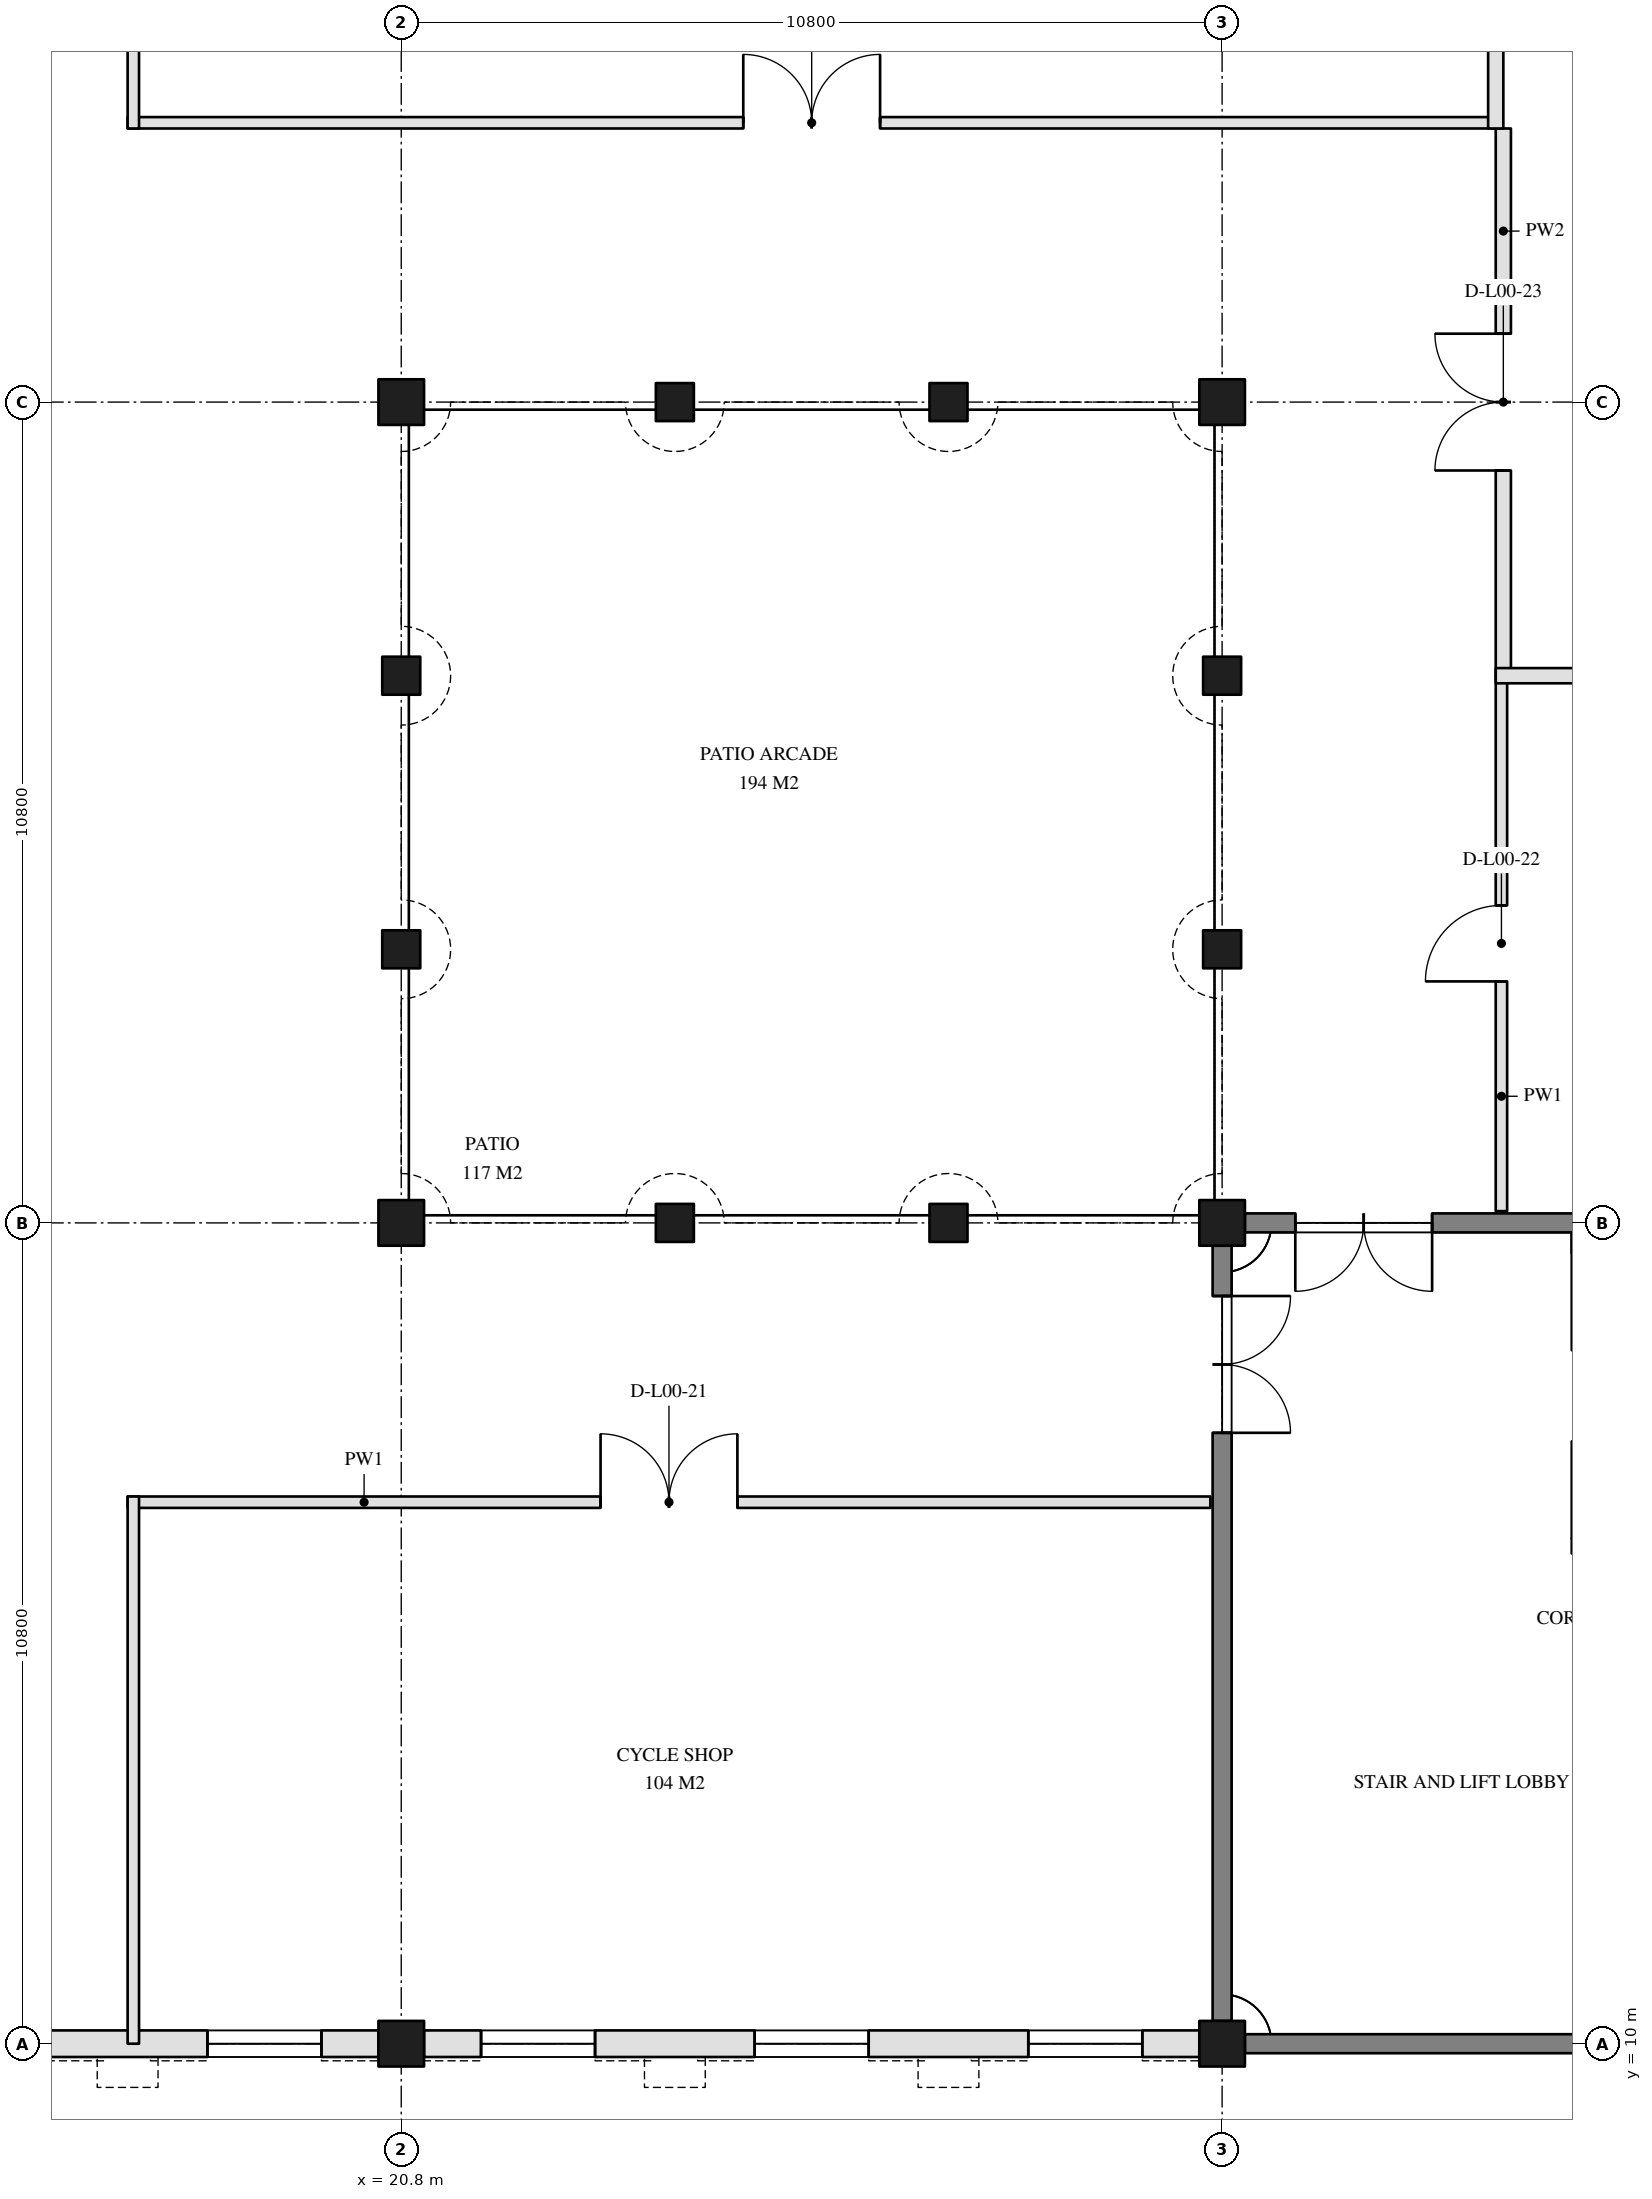
"""IFC4 building model, lengths in metres.
Left out: names, types, materials, properties, quantities, classifications, styles, units other than length and angle.
Written with IfcOpenShell. Run it as: python <this file> out.ifc"""

import sys

from ifc_helpers import new_model, si_unit, direction, frame, frame_2d, origin, origin_2d, place, context, subcontext, project, spatial, rectangle, extrude, element, fill, save


model = new_model("IFC4")
c1 = context("Model", 3, precision=1e-05, world=origin(), true_north=direction((0.0, 1.0)))
c2 = subcontext(c1, "Body", "Model", "MODEL_VIEW")
j1 = project(units=[si_unit("LENGTHUNIT", "METRE"), si_unit("PLANEANGLEUNIT", "RADIAN")], contexts=[c1])
p1 = place(None, origin())
s1 = spatial("IfcSite", under=j1, at=p1, CompositionType="ELEMENT")
p2 = place(p1, origin())
s2 = spatial("IfcBuilding", under=s1, at=p2, CompositionType="ELEMENT")
p3 = place(p2, origin())
s3 = spatial("IfcBuildingStorey", under=s2, at=p3, CompositionType="ELEMENT", Elevation=0.0)
p4 = place(p3, frame((20.8, 10.0, 0.0), z_axis=(0.0, 0.0, 1.0), x_axis=(1.0, 0.0, 0.0)))
e1 = element("IfcColumn", 1, at=p4, inside=s3, PredefinedType="COLUMN", context=c2, shape_type="SweptSolid", body=[
    extrude(rectangle(XDim=0.6, YDim=0.6, at=origin_2d()), origin(), (0.0, 0.0, 1.0), 3.85),
])
for number, where, z_axis, x_axis in (
    (2, (20.8, 20.8, 0.0), (0.0, 0.0, 1.0), (1.0, 0.0, 0.0)),
    (3, (20.8, 31.6, 0.0), (0.0, 0.0, 1.0), (1.0, 0.0, 0.0)),
):
    element("IfcColumn", number, at=place(p3, frame(where, z_axis=z_axis, x_axis=x_axis)), inside=s3, PredefinedType="COLUMN", context=c2, shape_type="SweptSolid", body=[
        extrude(rectangle(XDim=0.6, YDim=0.6, at=origin_2d()), origin(), (0.0, 0.0, 1.0), 4.8),
    ])
p5 = place(p3, frame((31.6, 10.0, 0.0), z_axis=(0.0, 0.0, 1.0), x_axis=(1.0, 0.0, 0.0)))
e4 = element("IfcColumn", 4, at=p5, inside=s3, PredefinedType="COLUMN", context=c2, shape_type="SweptSolid", body=[
    extrude(rectangle(XDim=0.6, YDim=0.6, at=origin_2d()), origin(), (0.0, 0.0, 1.0), 3.85),
])
for number, where, z_axis, x_axis in (
    (5, (31.6, 20.8, 0.0), (0.0, 0.0, 1.0), (1.0, 0.0, 0.0)),
    (6, (31.6, 31.6, 0.0), (0.0, 0.0, 1.0), (1.0, 0.0, 0.0)),
):
    element("IfcColumn", number, at=place(p3, frame(where, z_axis=z_axis, x_axis=x_axis)), inside=s3, PredefinedType="COLUMN", context=c2, shape_type="SweptSolid", body=[
        extrude(rectangle(XDim=0.6, YDim=0.6, at=origin_2d()), origin(), (0.0, 0.0, 1.0), 4.8),
    ])
for number, where, z_axis, x_axis in (
    (7, (24.4, 20.8, 0.0), (0.0, 0.0, 1.0), (1.0, 0.0, 0.0)),
    (8, (24.4, 31.6, 0.0), (0.0, 0.0, 1.0), (1.0, 0.0, 0.0)),
    (9, (20.8, 24.4, 0.0), (0.0, 0.0, 1.0), (1.0, 0.0, 0.0)),
    (10, (31.6, 24.4, 0.0), (0.0, 0.0, 1.0), (1.0, 0.0, 0.0)),
    (11, (28.0, 20.8, 0.0), (0.0, 0.0, 1.0), (1.0, 0.0, 0.0)),
    (12, (28.0, 31.6, 0.0), (0.0, 0.0, 1.0), (1.0, 0.0, 0.0)),
    (13, (20.8, 28.0, 0.0), (0.0, 0.0, 1.0), (1.0, 0.0, 0.0)),
    (14, (31.6, 28.0, 0.0), (0.0, 0.0, 1.0), (1.0, 0.0, 0.0)),
):
    element("IfcColumn", number, at=place(p3, frame(where, z_axis=z_axis, x_axis=x_axis)), inside=s3, PredefinedType="COLUMN", context=c2, shape_type="SweptSolid", body=[
        extrude(rectangle(XDim=0.5, YDim=0.5, at=origin_2d()), origin(), (0.0, 0.0, 1.0), 4.8),
    ])
p6 = place(p3, frame((31.9, 10.0, 0.0), z_axis=(0.0, 0.0, 1.0), x_axis=(1.0, 0.0, 0.0)))
e15 = element("IfcWall", 15, at=p6, inside=s3, PredefinedType="SOLIDWALL", context=c2, shape_type="SweptSolid", body=[
    extrude(rectangle(XDim=10.2, YDim=0.25, at=frame_2d((5.1, 0.0))), origin(), (0.0, 0.0, 1.0), 4.8),
])
p7 = place(p3, frame((42.1, 20.8, 0.0), z_axis=(0.0, 0.0, 1.0), x_axis=(-1.0, 0.0, 0.0)))
e16 = element("IfcWall", 16, at=p7, inside=s3, PredefinedType="SOLIDWALL", context=c2, shape_type="SweptSolid", body=[
    extrude(rectangle(XDim=10.2, YDim=0.25, at=frame_2d((5.1, 0.0))), origin(), (0.0, 0.0, 1.0), 4.8),
])
p8 = place(p7, frame((7.737, 0.0, 0.0)))
e17 = element("IfcOpeningElement", 17, at=p8, cuts=e16, PredefinedType="OPENING", context=c2, shape_type="SweptSolid", body=[
    extrude(rectangle(XDim=1.8, YDim=2.1, at=frame_2d((0.9, 1.05))), frame((0.0, 0.135, 0.0), z_axis=(0.0, -1.0, 0.0), x_axis=(1.0, 0.0, 0.0)), (0.0, 0.0, 1.0), 0.27),
])
p9 = place(p3, frame((31.6, 20.5, 0.0), z_axis=(0.0, 0.0, 1.0), x_axis=(0.0, -1.0, 0.0)))
e18 = element("IfcWall", 18, at=p9, inside=s3, PredefinedType="SOLIDWALL", context=c2, shape_type="SweptSolid", body=[
    extrude(rectangle(XDim=10.2, YDim=0.25, at=frame_2d((5.1, 0.0))), origin(), (0.0, 0.0, 1.0), 4.8),
])
p10 = place(p9, frame((0.662, 0.0, 0.0)))
e19 = element("IfcOpeningElement", 19, at=p10, cuts=e18, PredefinedType="OPENING", context=c2, shape_type="SweptSolid", body=[
    extrude(rectangle(XDim=1.8, YDim=2.1, at=frame_2d((0.9, 1.05))), frame((0.0, 0.135, 0.0), z_axis=(0.0, -1.0, 0.0), x_axis=(1.0, 0.0, 0.0)), (0.0, 0.0, 1.0), 0.27),
])
p11 = place(p3, frame((10.3, 10.0, 0.0), z_axis=(0.0, 0.0, 1.0), x_axis=(1.0, 0.0, 0.0)))
e20 = element("IfcWall", 20, at=p11, inside=s3, PredefinedType="SOLIDWALL", context=c2, shape_type="SweptSolid", body=[
    extrude(rectangle(XDim=10.2, YDim=0.35, at=frame_2d((5.1, 0.0))), origin(), (0.0, 0.0, 1.0), 3.85),
])
p12 = place(p11, frame((0.75, 0.0, 0.9)))
e21 = element("IfcOpeningElement", 21, at=p12, cuts=e20, PredefinedType="OPENING", context=c2, shape_type="SweptSolid", body=[
    extrude(rectangle(XDim=1.5, YDim=2.4, at=frame_2d((0.75, 1.2))), frame((0.0, 0.185, 0.0), z_axis=(0.0, -1.0, 0.0), x_axis=(1.0, 0.0, 0.0)), (0.0, 0.0, 1.0), 0.37),
])
p13 = place(p11, frame((4.35, 0.0, 0.9)))
e22 = element("IfcOpeningElement", 22, at=p13, cuts=e20, PredefinedType="OPENING", context=c2, shape_type="SweptSolid", body=[
    extrude(rectangle(XDim=1.5, YDim=2.4, at=frame_2d((0.75, 1.2))), frame((0.0, 0.185, 0.0), z_axis=(0.0, -1.0, 0.0), x_axis=(1.0, 0.0, 0.0)), (0.0, 0.0, 1.0), 0.37),
])
p14 = place(p11, frame((7.95, 0.0, 0.9)))
e23 = element("IfcOpeningElement", 23, at=p14, cuts=e20, PredefinedType="OPENING", context=c2, shape_type="SweptSolid", body=[
    extrude(rectangle(XDim=1.5, YDim=2.4, at=frame_2d((0.75, 1.2))), frame((0.0, 0.185, 0.0), z_axis=(0.0, -1.0, 0.0), x_axis=(1.0, 0.0, 0.0)), (0.0, 0.0, 1.0), 0.37),
])
p15 = place(p3, frame((21.1, 10.0, 0.0), z_axis=(0.0, 0.0, 1.0), x_axis=(1.0, 0.0, 0.0)))
e24 = element("IfcWall", 24, at=p15, inside=s3, PredefinedType="SOLIDWALL", context=c2, shape_type="SweptSolid", body=[
    extrude(rectangle(XDim=10.2, YDim=0.35, at=frame_2d((5.1, 0.0))), origin(), (0.0, 0.0, 1.0), 3.85),
])
p16 = place(p15, frame((0.75, 0.0, 0.9)))
e25 = element("IfcOpeningElement", 25, at=p16, cuts=e24, PredefinedType="OPENING", context=c2, shape_type="SweptSolid", body=[
    extrude(rectangle(XDim=1.5, YDim=2.4, at=frame_2d((0.75, 1.2))), frame((0.0, 0.185, 0.0), z_axis=(0.0, -1.0, 0.0), x_axis=(1.0, 0.0, 0.0)), (0.0, 0.0, 1.0), 0.37),
])
p17 = place(p15, frame((4.35, 0.0, 0.9)))
e26 = element("IfcOpeningElement", 26, at=p17, cuts=e24, PredefinedType="OPENING", context=c2, shape_type="SweptSolid", body=[
    extrude(rectangle(XDim=1.5, YDim=2.4, at=frame_2d((0.75, 1.2))), frame((0.0, 0.185, 0.0), z_axis=(0.0, -1.0, 0.0), x_axis=(1.0, 0.0, 0.0)), (0.0, 0.0, 1.0), 0.37),
])
p18 = place(p15, frame((7.95, 0.0, 0.9)))
e27 = element("IfcOpeningElement", 27, at=p18, cuts=e24, PredefinedType="OPENING", context=c2, shape_type="SweptSolid", body=[
    extrude(rectangle(XDim=1.5, YDim=2.4, at=frame_2d((0.75, 1.2))), frame((0.0, 0.185, 0.0), z_axis=(0.0, -1.0, 0.0), x_axis=(1.0, 0.0, 0.0)), (0.0, 0.0, 1.0), 0.37),
])
p19 = place(p3, frame((17.2, 17.125, 0.0), z_axis=(0.0, 0.0, 1.0), x_axis=(1.0, 0.0, 0.0)))
e28 = element("IfcWall", 28, at=p19, inside=s3, PredefinedType="PARTITIONING", context=c2, shape_type="SweptSolid", body=[
    extrude(rectangle(XDim=14.245, YDim=0.15, at=frame_2d((7.123, 0.0))), origin(), (0.0, 0.0, 1.0), 3.94),
])
p20 = place(p19, frame((6.222, 0.0, 0.0)))
e29 = element("IfcOpeningElement", 29, at=p20, cuts=e28, PredefinedType="OPENING", context=c2, shape_type="SweptSolid", body=[
    extrude(rectangle(XDim=1.8, YDim=2.1, at=frame_2d((0.9, 1.05))), frame((0.0, 0.085, 0.0), z_axis=(0.0, -1.0, 0.0), x_axis=(1.0, 0.0, 0.0)), (0.0, 0.0, 1.0), 0.17),
])
p21 = place(p3, frame((35.275, 20.955, 0.0), z_axis=(0.0, 0.0, 1.0), x_axis=(0.0, 1.0, 0.0)))
e30 = element("IfcWall", 30, at=p21, inside=s3, PredefinedType="PARTITIONING", context=c2, shape_type="SweptSolid", body=[
    extrude(rectangle(XDim=7.045, YDim=0.15, at=frame_2d((3.522, 0.0))), origin(), (0.0, 0.0, 1.0), 4.19),
])
p22 = place(p21, frame((3.022, 0.0, 0.0)))
e31 = element("IfcOpeningElement", 31, at=p22, cuts=e30, PredefinedType="OPENING", context=c2, shape_type="SweptSolid", body=[
    extrude(rectangle(XDim=1.0, YDim=2.1, at=frame_2d((0.5, 1.05))), frame((0.0, 0.085, 0.0), z_axis=(0.0, -1.0, 0.0), x_axis=(1.0, 0.0, 0.0)), (0.0, 0.0, 1.0), 0.17),
])
p23 = place(p3, frame((35.3, 28.0, 0.0), z_axis=(0.0, 0.0, 1.0), x_axis=(0.0, 1.0, 0.0)))
e32 = element("IfcWall", 32, at=p23, inside=s3, PredefinedType="PARTITIONING", context=c2, shape_type="SweptSolid", body=[
    extrude(rectangle(XDim=7.2, YDim=0.2, at=frame_2d((3.6, 0.0))), origin(), (0.0, 0.0, 1.0), 3.94),
])
p24 = place(p23, frame((2.7, 0.0, 0.0)))
e33 = element("IfcOpeningElement", 33, at=p24, cuts=e32, PredefinedType="OPENING", context=c2, shape_type="SweptSolid", body=[
    extrude(rectangle(XDim=1.8, YDim=2.1, at=frame_2d((0.9, 1.05))), frame((0.0, 0.11, 0.0), z_axis=(0.0, -1.0, 0.0), x_axis=(1.0, 0.0, 0.0)), (0.0, 0.0, 1.0), 0.22),
])
p25 = place(p3, frame((17.2, 35.275, 0.0), z_axis=(0.0, 0.0, 1.0), x_axis=(1.0, 0.0, 0.0)))
e34 = element("IfcWall", 34, at=p25, inside=s3, PredefinedType="PARTITIONING", context=c2, shape_type="SweptSolid", body=[
    extrude(rectangle(XDim=18.0, YDim=0.15, at=frame_2d((9.0, 0.0))), origin(), (0.0, 0.0, 1.0), 3.94),
])
p26 = place(p25, frame((8.1, 0.0, 0.0)))
e35 = element("IfcOpeningElement", 35, at=p26, cuts=e34, PredefinedType="OPENING", context=c2, shape_type="SweptSolid", body=[
    extrude(rectangle(XDim=1.8, YDim=2.1, at=frame_2d((0.9, 1.05))), frame((0.0, 0.085, 0.0), z_axis=(0.0, -1.0, 0.0), x_axis=(1.0, 0.0, 0.0)), (0.0, 0.0, 1.0), 0.17),
])
for number, where, z_axis, x_axis in (
    (36, (17.275, 10.0, 0.0), (0.0, 0.0, 1.0), (0.0, 1.0, 0.0)),
    (37, (17.275, 35.2, 0.0), (0.0, 0.0, 1.0), (0.0, 1.0, 0.0)),
):
    element("IfcWall", number, at=place(p3, frame(where, z_axis=z_axis, x_axis=x_axis)), inside=s3, PredefinedType="PARTITIONING", context=c2, shape_type="SweptSolid", body=[
        extrude(rectangle(XDim=7.2, YDim=0.15, at=frame_2d((3.6, 0.0))), origin(), (0.0, 0.0, 1.0), 3.85),
    ])
for number, where, z_axis, x_axis in (
    (38, (35.2, 28.0, 0.0), (0.0, 0.0, 1.0), (1.0, 0.0, 0.0)),
    (39, (35.2, 35.2, 0.0), (0.0, 0.0, 1.0), (0.0, 1.0, 0.0)),
):
    element("IfcWall", number, at=place(p3, frame(where, z_axis=z_axis, x_axis=x_axis)), inside=s3, PredefinedType="PARTITIONING", context=c2, shape_type="SweptSolid", body=[
        extrude(rectangle(XDim=7.2, YDim=0.2, at=frame_2d((3.6, 0.0))), origin(), (0.0, 0.0, 1.0), 3.85),
    ])
p27 = place(p14, origin())
e40 = element("IfcWindow", 40, at=p27, inside=s3, PartitioningType="SINGLE_PANEL", PredefinedType="WINDOW", context=c2, shape_type="SweptSolid", body=[
    extrude(rectangle(XDim=1.5, YDim=2.4, at=frame_2d((0.75, 1.2))), frame((0.0, 0.03, 0.0), z_axis=(0.0, -1.0, 0.0), x_axis=(1.0, 0.0, 0.0)), (0.0, 0.0, 1.0), 0.06),
])
fill(e23, e40)
p28 = place(p16, origin())
e41 = element("IfcWindow", 41, at=p28, inside=s3, PartitioningType="SINGLE_PANEL", PredefinedType="WINDOW", context=c2, shape_type="SweptSolid", body=[
    extrude(rectangle(XDim=1.5, YDim=2.4, at=frame_2d((0.75, 1.2))), frame((0.0, 0.03, 0.0), z_axis=(0.0, -1.0, 0.0), x_axis=(1.0, 0.0, 0.0)), (0.0, 0.0, 1.0), 0.06),
])
fill(e25, e41)
p29 = place(p17, origin())
e42 = element("IfcWindow", 42, at=p29, inside=s3, PartitioningType="SINGLE_PANEL", PredefinedType="WINDOW", context=c2, shape_type="SweptSolid", body=[
    extrude(rectangle(XDim=1.5, YDim=2.4, at=frame_2d((0.75, 1.2))), frame((0.0, 0.03, 0.0), z_axis=(0.0, -1.0, 0.0), x_axis=(1.0, 0.0, 0.0)), (0.0, 0.0, 1.0), 0.06),
])
fill(e26, e42)
p30 = place(p18, origin())
e43 = element("IfcWindow", 43, at=p30, inside=s3, PartitioningType="SINGLE_PANEL", PredefinedType="WINDOW", context=c2, shape_type="SweptSolid", body=[
    extrude(rectangle(XDim=1.5, YDim=2.4, at=frame_2d((0.75, 1.2))), frame((0.0, 0.03, 0.0), z_axis=(0.0, -1.0, 0.0), x_axis=(1.0, 0.0, 0.0)), (0.0, 0.0, 1.0), 0.06),
])
fill(e27, e43)
p31 = place(p10, frame((1.8, 0.0, 0.0), z_axis=(0.0, 0.0, 1.0), x_axis=(-1.0, 0.0, 0.0)))
e44 = element("IfcDoor", 44, at=p31, inside=s3, OperationType="DOUBLE_DOOR_DOUBLE_SWING", PredefinedType="DOOR", context=c2, shape_type="SweptSolid", body=[
    extrude(rectangle(XDim=1.8, YDim=2.1, at=frame_2d((0.9, 1.05))), frame((0.0, 0.025, 0.0), z_axis=(0.0, -1.0, 0.0), x_axis=(1.0, 0.0, 0.0)), (0.0, 0.0, 1.0), 0.05),
])
fill(e19, e44)
p32 = place(p8, frame((1.8, 0.0, 0.0), z_axis=(0.0, 0.0, 1.0), x_axis=(-1.0, 0.0, 0.0)))
e45 = element("IfcDoor", 45, at=p32, inside=s3, OperationType="DOUBLE_DOOR_DOUBLE_SWING", PredefinedType="DOOR", context=c2, shape_type="SweptSolid", body=[
    extrude(rectangle(XDim=1.8, YDim=2.1, at=frame_2d((0.9, 1.05))), frame((0.0, 0.025, 0.0), z_axis=(0.0, -1.0, 0.0), x_axis=(1.0, 0.0, 0.0)), (0.0, 0.0, 1.0), 0.05),
])
fill(e17, e45)
p33 = place(p20, frame((1.8, 0.0, 0.0), z_axis=(0.0, 0.0, 1.0), x_axis=(-1.0, 0.0, 0.0)))
e46 = element("IfcDoor", 46, at=p33, inside=s3, OperationType="DOUBLE_DOOR_DOUBLE_SWING", PredefinedType="DOOR", context=c2, shape_type="SweptSolid", body=[
    extrude(rectangle(XDim=1.8, YDim=2.1, at=frame_2d((0.9, 1.05))), frame((0.0, 0.025, 0.0), z_axis=(0.0, -1.0, 0.0), x_axis=(1.0, 0.0, 0.0)), (0.0, 0.0, 1.0), 0.05),
])
fill(e29, e46)
p34 = place(p22, origin())
e47 = element("IfcDoor", 47, at=p34, inside=s3, OperationType="SINGLE_SWING_LEFT", PredefinedType="DOOR", context=c2, shape_type="SweptSolid", body=[
    extrude(rectangle(XDim=1.0, YDim=2.1, at=frame_2d((0.5, 1.05))), frame((0.0, 0.025, 0.0), z_axis=(0.0, -1.0, 0.0), x_axis=(1.0, 0.0, 0.0)), (0.0, 0.0, 1.0), 0.05),
])
fill(e31, e47)
p35 = place(p24, frame((1.8, 0.0, 0.0), z_axis=(0.0, 0.0, 1.0), x_axis=(-1.0, 0.0, 0.0)))
e48 = element("IfcDoor", 48, at=p35, inside=s3, OperationType="DOUBLE_DOOR_DOUBLE_SWING", PredefinedType="DOOR", context=c2, shape_type="SweptSolid", body=[
    extrude(rectangle(XDim=1.8, YDim=2.1, at=frame_2d((0.9, 1.05))), frame((0.0, 0.025, 0.0), z_axis=(0.0, -1.0, 0.0), x_axis=(1.0, 0.0, 0.0)), (0.0, 0.0, 1.0), 0.05),
])
fill(e33, e48)
p36 = place(p26, origin())
e49 = element("IfcDoor", 49, at=p36, inside=s3, OperationType="DOUBLE_DOOR_DOUBLE_SWING", PredefinedType="DOOR", context=c2, shape_type="SweptSolid", body=[
    extrude(rectangle(XDim=1.8, YDim=2.1, at=frame_2d((0.9, 1.05))), frame((0.0, 0.025, 0.0), z_axis=(0.0, -1.0, 0.0), x_axis=(1.0, 0.0, 0.0)), (0.0, 0.0, 1.0), 0.05),
])
fill(e35, e49)
save(model, sys.argv[1])
